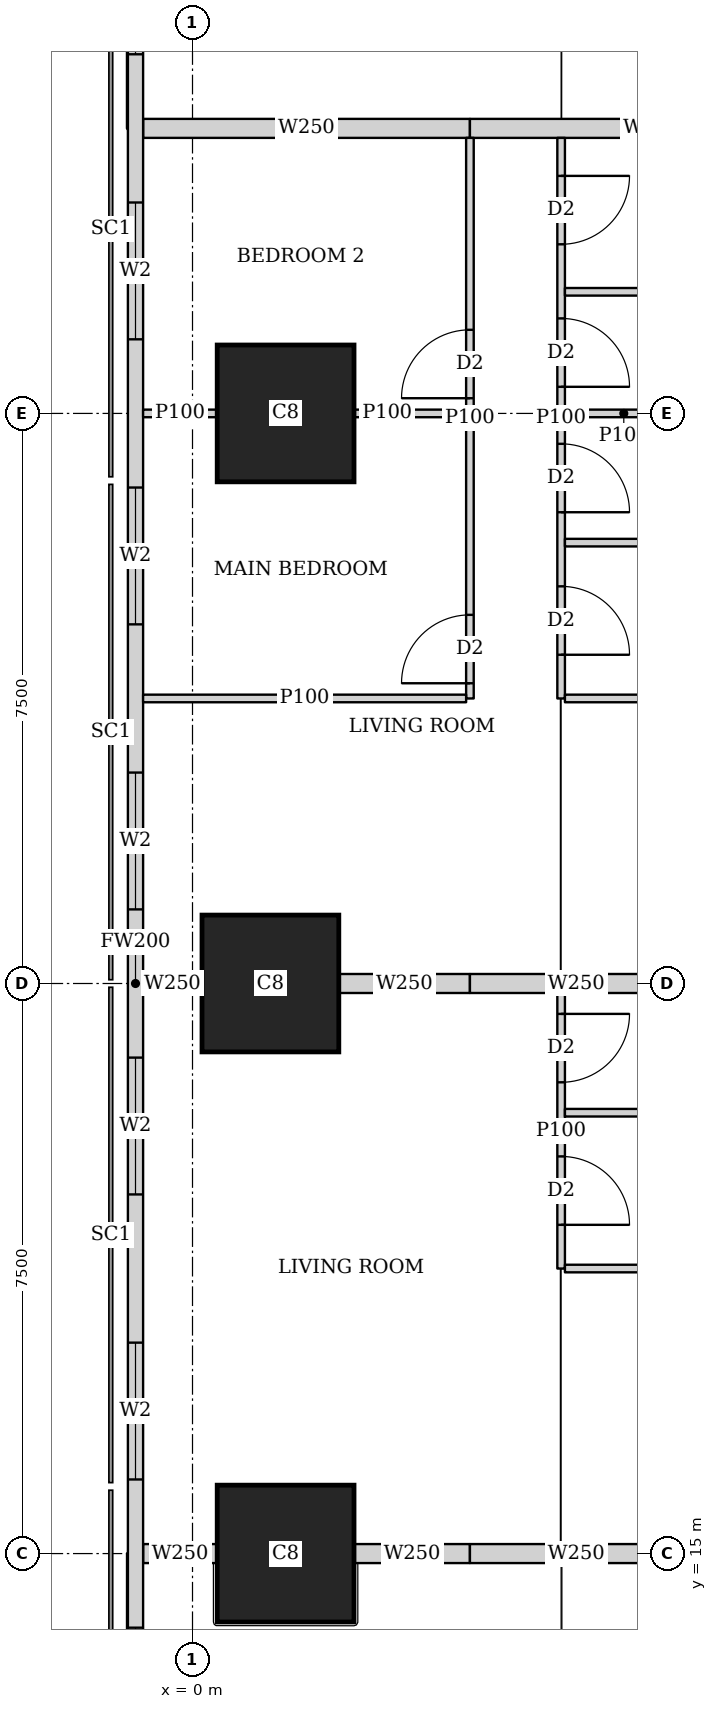
"""IFC4 building model, lengths in metres.
Left out: names, types, materials, properties, quantities, classifications, styles, units other than length and angle.
Written with IfcOpenShell. Run it as: python <this file> out.ifc"""

import sys

from ifc_helpers import new_model, si_unit, direction, frame, frame_2d, origin, origin_2d, place, context, subcontext, project, spatial, rectangle, extrude, element, fill, save


model = new_model("IFC4")
c1 = context("Model", 3, precision=1e-05, world=origin(), true_north=direction((0.0, 1.0)))
c2 = subcontext(c1, "Body", "Model", "MODEL_VIEW")
j1 = project(units=[si_unit("LENGTHUNIT", "METRE"), si_unit("PLANEANGLEUNIT", "RADIAN")], contexts=[c1])
p1 = place(None, origin())
s1 = spatial("IfcSite", under=j1, at=p1, CompositionType="ELEMENT")
p2 = place(p1, origin())
s2 = spatial("IfcBuilding", under=s1, at=p2, CompositionType="ELEMENT")
p3 = place(p2, frame((0.0, 0.0, 184.55)))
s3 = spatial("IfcBuildingStorey", under=s2, at=p3, CompositionType="ELEMENT", Elevation=184.55)
for number, where, z_axis, x_axis in (
    (1, (1.225, 15.0, 0.0), (0.0, 0.0, 1.0), (1.0, 0.0, 0.0)),
    (2, (1.025, 22.5, 0.0), (0.0, 0.0, 1.0), (1.0, 0.0, 0.0)),
    (3, (1.225, 30.0, 0.0), (0.0, 0.0, 1.0), (1.0, 0.0, 0.0)),
):
    element("IfcColumn", number, at=place(p3, frame(where, z_axis=z_axis, x_axis=x_axis)), inside=s3, PredefinedType="COLUMN", context=c2, shape_type="SweptSolid", body=[
        extrude(rectangle(XDim=1.8, YDim=1.8, at=origin_2d()), origin(), (0.0, 0.0, 1.0), 3.75),
    ])
p4 = place(p3, frame((-0.75, 42.837, 0.0), z_axis=(0.0, 0.0, 1.0), x_axis=(0.0, -1.0, 0.0)))
e4 = element("IfcWall", 4, at=p4, inside=s3, PredefinedType="SOLIDWALL", context=c2, shape_type="SweptSolid", body=[
    extrude(rectangle(XDim=40.674, YDim=0.2, at=frame_2d((20.337, 0.0))), origin(), (0.0, 0.0, 1.0), 3.45),
])
p5 = place(p4, frame((1.78, 0.0, 0.9)))
e5 = element("IfcOpeningElement", 5, at=p5, cuts=e4, PredefinedType="OPENING", context=c2, shape_type="SweptSolid", body=[
    extrude(rectangle(XDim=1.8, YDim=1.5, at=frame_2d((0.9, 0.75))), frame((0.0, 0.11, 0.0), z_axis=(0.0, -1.0, 0.0), x_axis=(1.0, 0.0, 0.0)), (0.0, 0.0, 1.0), 0.22),
])
p6 = place(p4, frame((6.312, 0.0, 0.9)))
e6 = element("IfcOpeningElement", 6, at=p6, cuts=e4, PredefinedType="OPENING", context=c2, shape_type="SweptSolid", body=[
    extrude(rectangle(XDim=1.8, YDim=1.5, at=frame_2d((0.9, 0.75))), frame((0.0, 0.11, 0.0), z_axis=(0.0, -1.0, 0.0), x_axis=(1.0, 0.0, 0.0)), (0.0, 0.0, 1.0), 0.22),
])
p7 = place(p4, frame((10.062, 0.0, 0.9)))
e7 = element("IfcOpeningElement", 7, at=p7, cuts=e4, PredefinedType="OPENING", context=c2, shape_type="SweptSolid", body=[
    extrude(rectangle(XDim=1.8, YDim=1.5, at=frame_2d((0.9, 0.75))), frame((0.0, 0.11, 0.0), z_axis=(0.0, -1.0, 0.0), x_axis=(1.0, 0.0, 0.0)), (0.0, 0.0, 1.0), 0.22),
])
p8 = place(p4, frame((13.812, 0.0, 0.9)))
e8 = element("IfcOpeningElement", 8, at=p8, cuts=e4, PredefinedType="OPENING", context=c2, shape_type="SweptSolid", body=[
    extrude(rectangle(XDim=1.8, YDim=1.5, at=frame_2d((0.9, 0.75))), frame((0.0, 0.11, 0.0), z_axis=(0.0, -1.0, 0.0), x_axis=(1.0, 0.0, 0.0)), (0.0, 0.0, 1.0), 0.22),
])
p9 = place(p4, frame((17.562, 0.0, 0.9)))
e9 = element("IfcOpeningElement", 9, at=p9, cuts=e4, PredefinedType="OPENING", context=c2, shape_type="SweptSolid", body=[
    extrude(rectangle(XDim=1.8, YDim=1.5, at=frame_2d((0.9, 0.75))), frame((0.0, 0.11, 0.0), z_axis=(0.0, -1.0, 0.0), x_axis=(1.0, 0.0, 0.0)), (0.0, 0.0, 1.0), 0.22),
])
p10 = place(p4, frame((21.312, 0.0, 0.9)))
e10 = element("IfcOpeningElement", 10, at=p10, cuts=e4, PredefinedType="OPENING", context=c2, shape_type="SweptSolid", body=[
    extrude(rectangle(XDim=1.8, YDim=1.5, at=frame_2d((0.9, 0.75))), frame((0.0, 0.11, 0.0), z_axis=(0.0, -1.0, 0.0), x_axis=(1.0, 0.0, 0.0)), (0.0, 0.0, 1.0), 0.22),
])
p11 = place(p4, frame((25.062, 0.0, 0.9)))
e11 = element("IfcOpeningElement", 11, at=p11, cuts=e4, PredefinedType="OPENING", context=c2, shape_type="SweptSolid", body=[
    extrude(rectangle(XDim=1.8, YDim=1.5, at=frame_2d((0.9, 0.75))), frame((0.0, 0.11, 0.0), z_axis=(0.0, -1.0, 0.0), x_axis=(1.0, 0.0, 0.0)), (0.0, 0.0, 1.0), 0.22),
])
p12 = place(p4, frame((28.812, 0.0, 0.9)))
e12 = element("IfcOpeningElement", 12, at=p12, cuts=e4, PredefinedType="OPENING", context=c2, shape_type="SweptSolid", body=[
    extrude(rectangle(XDim=1.8, YDim=1.5, at=frame_2d((0.9, 0.75))), frame((0.0, 0.11, 0.0), z_axis=(0.0, -1.0, 0.0), x_axis=(1.0, 0.0, 0.0)), (0.0, 0.0, 1.0), 0.22),
])
p13 = place(p4, frame((32.562, 0.0, 0.9)))
e13 = element("IfcOpeningElement", 13, at=p13, cuts=e4, PredefinedType="OPENING", context=c2, shape_type="SweptSolid", body=[
    extrude(rectangle(XDim=1.8, YDim=1.5, at=frame_2d((0.9, 0.75))), frame((0.0, 0.11, 0.0), z_axis=(0.0, -1.0, 0.0), x_axis=(1.0, 0.0, 0.0)), (0.0, 0.0, 1.0), 0.22),
])
p14 = place(p4, frame((37.094, 0.0, 0.9)))
e14 = element("IfcOpeningElement", 14, at=p14, cuts=e4, PredefinedType="OPENING", context=c2, shape_type="SweptSolid", body=[
    extrude(rectangle(XDim=1.8, YDim=1.5, at=frame_2d((0.9, 0.75))), frame((0.0, 0.11, 0.0), z_axis=(0.0, -1.0, 0.0), x_axis=(1.0, 0.0, 0.0)), (0.0, 0.0, 1.0), 0.22),
])
p15 = place(p3, frame((4.85, 18.75, 0.0), z_axis=(0.0, 0.0, 1.0), x_axis=(0.0, 1.0, 0.0)))
e15 = element("IfcWall", 15, at=p15, inside=s3, PredefinedType="PARTITIONING", context=c2, shape_type="SweptSolid", body=[
    extrude(rectangle(XDim=3.625, YDim=0.1, at=frame_2d((1.812, 0.0))), origin(), (0.0, 0.0, 1.0), 3.45),
])
p16 = place(p15, frame((0.575, 0.0, 0.0)))
e16 = element("IfcOpeningElement", 16, at=p16, cuts=e15, PredefinedType="OPENING", context=c2, shape_type="SweptSolid", body=[
    extrude(rectangle(XDim=0.9, YDim=2.1, at=frame_2d((0.45, 1.05))), frame((0.0, 0.06, 0.0), z_axis=(0.0, -1.0, 0.0), x_axis=(1.0, 0.0, 0.0)), (0.0, 0.0, 1.0), 0.12),
])
p17 = place(p15, frame((2.45, 0.0, 0.0)))
e17 = element("IfcOpeningElement", 17, at=p17, cuts=e15, PredefinedType="OPENING", context=c2, shape_type="SweptSolid", body=[
    extrude(rectangle(XDim=0.9, YDim=2.1, at=frame_2d((0.45, 1.05))), frame((0.0, 0.06, 0.0), z_axis=(0.0, -1.0, 0.0), x_axis=(1.0, 0.0, 0.0)), (0.0, 0.0, 1.0), 0.12),
])
for number, where, z_axis, x_axis in (
    (18, (4.9, 18.75, 0.0), (0.0, 0.0, 1.0), (1.0, 0.0, 0.0)),
    (19, (4.9, 20.8, 0.0), (0.0, 0.0, 1.0), (1.0, 0.0, 0.0)),
):
    element("IfcWall", number, at=place(p3, frame(where, z_axis=z_axis, x_axis=x_axis)), inside=s3, PredefinedType="PARTITIONING", context=c2, shape_type="SweptSolid", body=[
        extrude(rectangle(XDim=3.525, YDim=0.1, at=frame_2d((1.763, 0.0))), origin(), (0.0, 0.0, 1.0), 3.45),
    ])
p18 = place(p3, frame((-0.65, 15.0, 0.0), z_axis=(0.0, 0.0, 1.0), x_axis=(1.0, 0.0, 0.0)))
e20 = element("IfcWall", 20, at=p18, inside=s3, PredefinedType="SOLIDWALL", context=c2, shape_type="SweptSolid", body=[
    extrude(rectangle(XDim=0.974, YDim=0.25, at=frame_2d((0.487, 0.0))), origin(), (0.0, 0.0, 1.0), 2.05),
])
p19 = place(p3, frame((2.126, 15.0, 0.0), z_axis=(0.0, 0.0, 1.0), x_axis=(1.0, 0.0, 0.0)))
e21 = element("IfcWall", 21, at=p19, inside=s3, PredefinedType="SOLIDWALL", context=c2, shape_type="SweptSolid", body=[
    extrude(rectangle(XDim=1.524, YDim=0.25, at=frame_2d((0.762, 0.0))), origin(), (0.0, 0.0, 1.0), 2.05),
])
p20 = place(p3, frame((3.65, 15.0, 0.0), z_axis=(0.0, 0.0, 1.0), x_axis=(1.0, 0.0, 0.0)))
e22 = element("IfcWall", 22, at=p20, inside=s3, PredefinedType="SOLIDWALL", context=c2, shape_type="SweptSolid", body=[
    extrude(rectangle(XDim=2.799, YDim=0.25, at=frame_2d((1.399, 0.0))), origin(), (0.0, 0.0, 1.0), 3.45),
])
p21 = place(p3, frame((3.65, 26.25, 0.0), z_axis=(0.0, 0.0, 1.0), x_axis=(0.0, 1.0, 0.0)))
e23 = element("IfcWall", 23, at=p21, inside=s3, PredefinedType="PARTITIONING", context=c2, shape_type="SweptSolid", body=[
    extrude(rectangle(XDim=7.375, YDim=0.1, at=frame_2d((3.688, 0.0))), origin(), (0.0, 0.0, 1.0), 3.45),
])
p22 = place(p21, frame((0.2, 0.0, 0.0)))
e24 = element("IfcOpeningElement", 24, at=p22, cuts=e23, PredefinedType="OPENING", context=c2, shape_type="SweptSolid", body=[
    extrude(rectangle(XDim=0.9, YDim=2.1, at=frame_2d((0.45, 1.05))), frame((0.0, 0.06, 0.0), z_axis=(0.0, -1.0, 0.0), x_axis=(1.0, 0.0, 0.0)), (0.0, 0.0, 1.0), 0.12),
])
p23 = place(p21, frame((3.95, 0.0, 0.0)))
e25 = element("IfcOpeningElement", 25, at=p23, cuts=e23, PredefinedType="OPENING", context=c2, shape_type="SweptSolid", body=[
    extrude(rectangle(XDim=0.9, YDim=2.1, at=frame_2d((0.45, 1.05))), frame((0.0, 0.06, 0.0), z_axis=(0.0, -1.0, 0.0), x_axis=(1.0, 0.0, 0.0)), (0.0, 0.0, 1.0), 0.12),
])
p24 = place(p3, frame((4.85, 26.25, 0.0), z_axis=(0.0, 0.0, 1.0), x_axis=(0.0, 1.0, 0.0)))
e26 = element("IfcWall", 26, at=p24, inside=s3, PredefinedType="PARTITIONING", context=c2, shape_type="SweptSolid", body=[
    extrude(rectangle(XDim=7.375, YDim=0.1, at=frame_2d((3.688, 0.0))), origin(), (0.0, 0.0, 1.0), 3.45),
])
p25 = place(p24, frame((0.575, 0.0, 0.0)))
e27 = element("IfcOpeningElement", 27, at=p25, cuts=e26, PredefinedType="OPENING", context=c2, shape_type="SweptSolid", body=[
    extrude(rectangle(XDim=0.9, YDim=2.1, at=frame_2d((0.45, 1.05))), frame((0.0, 0.06, 0.0), z_axis=(0.0, -1.0, 0.0), x_axis=(1.0, 0.0, 0.0)), (0.0, 0.0, 1.0), 0.12),
])
p26 = place(p24, frame((4.1, 0.0, 0.0)))
e28 = element("IfcOpeningElement", 28, at=p26, cuts=e26, PredefinedType="OPENING", context=c2, shape_type="SweptSolid", body=[
    extrude(rectangle(XDim=0.9, YDim=2.1, at=frame_2d((0.45, 1.05))), frame((0.0, 0.06, 0.0), z_axis=(0.0, -1.0, 0.0), x_axis=(1.0, 0.0, 0.0)), (0.0, 0.0, 1.0), 0.12),
])
p27 = place(p24, frame((2.45, 0.0, 0.0)))
e29 = element("IfcOpeningElement", 29, at=p27, cuts=e26, PredefinedType="OPENING", context=c2, shape_type="SweptSolid", body=[
    extrude(rectangle(XDim=0.9, YDim=2.1, at=frame_2d((0.45, 1.05))), frame((0.0, 0.06, 0.0), z_axis=(0.0, -1.0, 0.0), x_axis=(1.0, 0.0, 0.0)), (0.0, 0.0, 1.0), 0.12),
])
p28 = place(p24, frame((5.975, 0.0, 0.0)))
e30 = element("IfcOpeningElement", 30, at=p28, cuts=e26, PredefinedType="OPENING", context=c2, shape_type="SweptSolid", body=[
    extrude(rectangle(XDim=0.9, YDim=2.1, at=frame_2d((0.45, 1.05))), frame((0.0, 0.06, 0.0), z_axis=(0.0, -1.0, 0.0), x_axis=(1.0, 0.0, 0.0)), (0.0, 0.0, 1.0), 0.12),
])
p29 = place(p3, frame((-0.65, 26.25, 0.0), z_axis=(0.0, 0.0, 1.0), x_axis=(1.0, 0.0, 0.0)))
e31 = element("IfcWall", 31, at=p29, inside=s3, PredefinedType="PARTITIONING", context=c2, shape_type="SweptSolid", body=[
    extrude(rectangle(XDim=4.25, YDim=0.1, at=frame_2d((2.125, 0.0))), origin(), (0.0, 0.0, 1.0), 2.05),
])
p30 = place(p3, frame((-0.65, 30.0, 0.0), z_axis=(0.0, 0.0, 1.0), x_axis=(1.0, 0.0, 0.0)))
e32 = element("IfcWall", 32, at=p30, inside=s3, PredefinedType="PARTITIONING", context=c2, shape_type="SweptSolid", body=[
    extrude(rectangle(XDim=0.974, YDim=0.1, at=frame_2d((0.487, 0.0))), origin(), (0.0, 0.0, 1.0), 3.45),
])
p31 = place(p3, frame((2.126, 30.0, 0.0), z_axis=(0.0, 0.0, 1.0), x_axis=(1.0, 0.0, 0.0)))
e33 = element("IfcWall", 33, at=p31, inside=s3, PredefinedType="PARTITIONING", context=c2, shape_type="SweptSolid", body=[
    extrude(rectangle(XDim=1.474, YDim=0.1, at=frame_2d((0.737, 0.0))), origin(), (0.0, 0.0, 1.0), 3.45),
])
p32 = place(p3, frame((4.9, 26.25, 0.0), z_axis=(0.0, 0.0, 1.0), x_axis=(1.0, 0.0, 0.0)))
e34 = element("IfcWall", 34, at=p32, inside=s3, PredefinedType="PARTITIONING", context=c2, shape_type="SweptSolid", body=[
    extrude(rectangle(XDim=3.525, YDim=0.1, at=frame_2d((1.763, 0.0))), origin(), (0.0, 0.0, 1.0), 3.45),
])
p33 = place(p3, frame((4.9, 30.0, 0.0), z_axis=(0.0, 0.0, 1.0), x_axis=(1.0, 0.0, 0.0)))
e35 = element("IfcWall", 35, at=p33, inside=s3, PredefinedType="PARTITIONING", context=c2, shape_type="SweptSolid", body=[
    extrude(rectangle(XDim=1.549, YDim=0.1, at=frame_2d((0.774, 0.0))), origin(), (0.0, 0.0, 1.0), 3.45),
])
for number, where, z_axis, x_axis in (
    (36, (4.9, 28.3, 0.0), (0.0, 0.0, 1.0), (1.0, 0.0, 0.0)),
    (37, (4.9, 31.6, 0.0), (0.0, 0.0, 1.0), (1.0, 0.0, 0.0)),
):
    element("IfcWall", number, at=place(p3, frame(where, z_axis=z_axis, x_axis=x_axis)), inside=s3, PredefinedType="PARTITIONING", context=c2, shape_type="SweptSolid", body=[
        extrude(rectangle(XDim=3.525, YDim=0.1, at=frame_2d((1.763, 0.0))), origin(), (0.0, 0.0, 1.0), 3.45),
    ])
p34 = place(p3, frame((-0.65, 22.5, 0.0), z_axis=(0.0, 0.0, 1.0), x_axis=(1.0, 0.0, 0.0)))
e38 = element("IfcWall", 38, at=p34, inside=s3, PredefinedType="SOLIDWALL", context=c2, shape_type="SweptSolid", body=[
    extrude(rectangle(XDim=0.774, YDim=0.25, at=frame_2d((0.387, 0.0))), origin(), (0.0, 0.0, 1.0), 2.05),
])
p35 = place(p3, frame((1.926, 22.5, 0.0), z_axis=(0.0, 0.0, 1.0), x_axis=(1.0, 0.0, 0.0)))
e39 = element("IfcWall", 39, at=p35, inside=s3, PredefinedType="SOLIDWALL", context=c2, shape_type="SweptSolid", body=[
    extrude(rectangle(XDim=1.724, YDim=0.25, at=frame_2d((0.862, 0.0))), origin(), (0.0, 0.0, 1.0), 2.05),
])
p36 = place(p3, frame((3.65, 22.5, 0.0), z_axis=(0.0, 0.0, 1.0), x_axis=(1.0, 0.0, 0.0)))
e40 = element("IfcWall", 40, at=p36, inside=s3, PredefinedType="SOLIDWALL", context=c2, shape_type="SweptSolid", body=[
    extrude(rectangle(XDim=2.799, YDim=0.25, at=frame_2d((1.399, 0.0))), origin(), (0.0, 0.0, 1.0), 3.45),
])
p37 = place(p3, frame((-0.65, 33.75, 0.0), z_axis=(0.0, 0.0, 1.0), x_axis=(1.0, 0.0, 0.0)))
e41 = element("IfcWall", 41, at=p37, inside=s3, PredefinedType="SOLIDWALL", context=c2, shape_type="SweptSolid", body=[
    extrude(rectangle(XDim=4.3, YDim=0.25, at=frame_2d((2.15, 0.0))), origin(), (0.0, 0.0, 1.0), 2.05),
])
p38 = place(p3, frame((3.65, 33.75, 0.0), z_axis=(0.0, 0.0, 1.0), x_axis=(1.0, 0.0, 0.0)))
e42 = element("IfcWall", 42, at=p38, inside=s3, PredefinedType="SOLIDWALL", context=c2, shape_type="SweptSolid", body=[
    extrude(rectangle(XDim=4.775, YDim=0.25, at=frame_2d((2.388, 0.0))), origin(), (0.0, 0.0, 1.0), 3.45),
])
p39 = place(p6, origin())
e43 = element("IfcWindow", 43, at=p39, inside=s3, PartitioningType="SINGLE_PANEL", PredefinedType="WINDOW", context=c2, shape_type="SweptSolid", body=[
    extrude(rectangle(XDim=1.8, YDim=1.5, at=frame_2d((0.9, 0.75))), frame((0.0, 0.03, 0.0), z_axis=(0.0, -1.0, 0.0), x_axis=(1.0, 0.0, 0.0)), (0.0, 0.0, 1.0), 0.06),
])
fill(e6, e43)
p40 = place(p7, origin())
e44 = element("IfcWindow", 44, at=p40, inside=s3, PartitioningType="SINGLE_PANEL", PredefinedType="WINDOW", context=c2, shape_type="SweptSolid", body=[
    extrude(rectangle(XDim=1.8, YDim=1.5, at=frame_2d((0.9, 0.75))), frame((0.0, 0.03, 0.0), z_axis=(0.0, -1.0, 0.0), x_axis=(1.0, 0.0, 0.0)), (0.0, 0.0, 1.0), 0.06),
])
fill(e7, e44)
p41 = place(p8, origin())
e45 = element("IfcWindow", 45, at=p41, inside=s3, PartitioningType="SINGLE_PANEL", PredefinedType="WINDOW", context=c2, shape_type="SweptSolid", body=[
    extrude(rectangle(XDim=1.8, YDim=1.5, at=frame_2d((0.9, 0.75))), frame((0.0, 0.03, 0.0), z_axis=(0.0, -1.0, 0.0), x_axis=(1.0, 0.0, 0.0)), (0.0, 0.0, 1.0), 0.06),
])
fill(e8, e45)
p42 = place(p9, origin())
e46 = element("IfcWindow", 46, at=p42, inside=s3, PartitioningType="SINGLE_PANEL", PredefinedType="WINDOW", context=c2, shape_type="SweptSolid", body=[
    extrude(rectangle(XDim=1.8, YDim=1.5, at=frame_2d((0.9, 0.75))), frame((0.0, 0.03, 0.0), z_axis=(0.0, -1.0, 0.0), x_axis=(1.0, 0.0, 0.0)), (0.0, 0.0, 1.0), 0.06),
])
fill(e9, e46)
p43 = place(p10, origin())
e47 = element("IfcWindow", 47, at=p43, inside=s3, PartitioningType="SINGLE_PANEL", PredefinedType="WINDOW", context=c2, shape_type="SweptSolid", body=[
    extrude(rectangle(XDim=1.8, YDim=1.5, at=frame_2d((0.9, 0.75))), frame((0.0, 0.03, 0.0), z_axis=(0.0, -1.0, 0.0), x_axis=(1.0, 0.0, 0.0)), (0.0, 0.0, 1.0), 0.06),
])
fill(e10, e47)
p44 = place(p11, origin())
e48 = element("IfcWindow", 48, at=p44, inside=s3, PartitioningType="SINGLE_PANEL", PredefinedType="WINDOW", context=c2, shape_type="SweptSolid", body=[
    extrude(rectangle(XDim=1.8, YDim=1.5, at=frame_2d((0.9, 0.75))), frame((0.0, 0.03, 0.0), z_axis=(0.0, -1.0, 0.0), x_axis=(1.0, 0.0, 0.0)), (0.0, 0.0, 1.0), 0.06),
])
fill(e11, e48)
p45 = place(p12, origin())
e49 = element("IfcWindow", 49, at=p45, inside=s3, PartitioningType="SINGLE_PANEL", PredefinedType="WINDOW", context=c2, shape_type="SweptSolid", body=[
    extrude(rectangle(XDim=1.8, YDim=1.5, at=frame_2d((0.9, 0.75))), frame((0.0, 0.03, 0.0), z_axis=(0.0, -1.0, 0.0), x_axis=(1.0, 0.0, 0.0)), (0.0, 0.0, 1.0), 0.06),
])
fill(e12, e49)
p46 = place(p16, origin())
e50 = element("IfcDoor", 50, at=p46, inside=s3, OperationType="SINGLE_SWING_RIGHT", PredefinedType="DOOR", context=c2, shape_type="SweptSolid", body=[
    extrude(rectangle(XDim=0.9, YDim=2.1, at=frame_2d((0.45, 1.05))), frame((0.0, 0.025, 0.0), z_axis=(0.0, -1.0, 0.0), x_axis=(1.0, 0.0, 0.0)), (0.0, 0.0, 1.0), 0.05),
])
fill(e16, e50)
p47 = place(p17, origin())
e51 = element("IfcDoor", 51, at=p47, inside=s3, OperationType="SINGLE_SWING_LEFT", PredefinedType="DOOR", context=c2, shape_type="SweptSolid", body=[
    extrude(rectangle(XDim=0.9, YDim=2.1, at=frame_2d((0.45, 1.05))), frame((0.0, 0.025, 0.0), z_axis=(0.0, -1.0, 0.0), x_axis=(1.0, 0.0, 0.0)), (0.0, 0.0, 1.0), 0.05),
])
fill(e17, e51)
p48 = place(p22, origin())
e52 = element("IfcDoor", 52, at=p48, inside=s3, OperationType="SINGLE_SWING_LEFT", PredefinedType="DOOR", context=c2, shape_type="SweptSolid", body=[
    extrude(rectangle(XDim=0.9, YDim=2.1, at=frame_2d((0.45, 1.05))), frame((0.0, 0.025, 0.0), z_axis=(0.0, -1.0, 0.0), x_axis=(1.0, 0.0, 0.0)), (0.0, 0.0, 1.0), 0.05),
])
fill(e24, e52)
p49 = place(p23, origin())
e53 = element("IfcDoor", 53, at=p49, inside=s3, OperationType="SINGLE_SWING_LEFT", PredefinedType="DOOR", context=c2, shape_type="SweptSolid", body=[
    extrude(rectangle(XDim=0.9, YDim=2.1, at=frame_2d((0.45, 1.05))), frame((0.0, 0.025, 0.0), z_axis=(0.0, -1.0, 0.0), x_axis=(1.0, 0.0, 0.0)), (0.0, 0.0, 1.0), 0.05),
])
fill(e25, e53)
p50 = place(p25, origin())
e54 = element("IfcDoor", 54, at=p50, inside=s3, OperationType="SINGLE_SWING_RIGHT", PredefinedType="DOOR", context=c2, shape_type="SweptSolid", body=[
    extrude(rectangle(XDim=0.9, YDim=2.1, at=frame_2d((0.45, 1.05))), frame((0.0, 0.025, 0.0), z_axis=(0.0, -1.0, 0.0), x_axis=(1.0, 0.0, 0.0)), (0.0, 0.0, 1.0), 0.05),
])
fill(e27, e54)
p51 = place(p26, origin())
e55 = element("IfcDoor", 55, at=p51, inside=s3, OperationType="SINGLE_SWING_RIGHT", PredefinedType="DOOR", context=c2, shape_type="SweptSolid", body=[
    extrude(rectangle(XDim=0.9, YDim=2.1, at=frame_2d((0.45, 1.05))), frame((0.0, 0.025, 0.0), z_axis=(0.0, -1.0, 0.0), x_axis=(1.0, 0.0, 0.0)), (0.0, 0.0, 1.0), 0.05),
])
fill(e28, e55)
p52 = place(p27, origin())
e56 = element("IfcDoor", 56, at=p52, inside=s3, OperationType="SINGLE_SWING_RIGHT", PredefinedType="DOOR", context=c2, shape_type="SweptSolid", body=[
    extrude(rectangle(XDim=0.9, YDim=2.1, at=frame_2d((0.45, 1.05))), frame((0.0, 0.025, 0.0), z_axis=(0.0, -1.0, 0.0), x_axis=(1.0, 0.0, 0.0)), (0.0, 0.0, 1.0), 0.05),
])
fill(e29, e56)
p53 = place(p28, origin())
e57 = element("IfcDoor", 57, at=p53, inside=s3, OperationType="SINGLE_SWING_LEFT", PredefinedType="DOOR", context=c2, shape_type="SweptSolid", body=[
    extrude(rectangle(XDim=0.9, YDim=2.1, at=frame_2d((0.45, 1.05))), frame((0.0, 0.025, 0.0), z_axis=(0.0, -1.0, 0.0), x_axis=(1.0, 0.0, 0.0)), (0.0, 0.0, 1.0), 0.05),
])
fill(e30, e57)
save(model, sys.argv[1])
